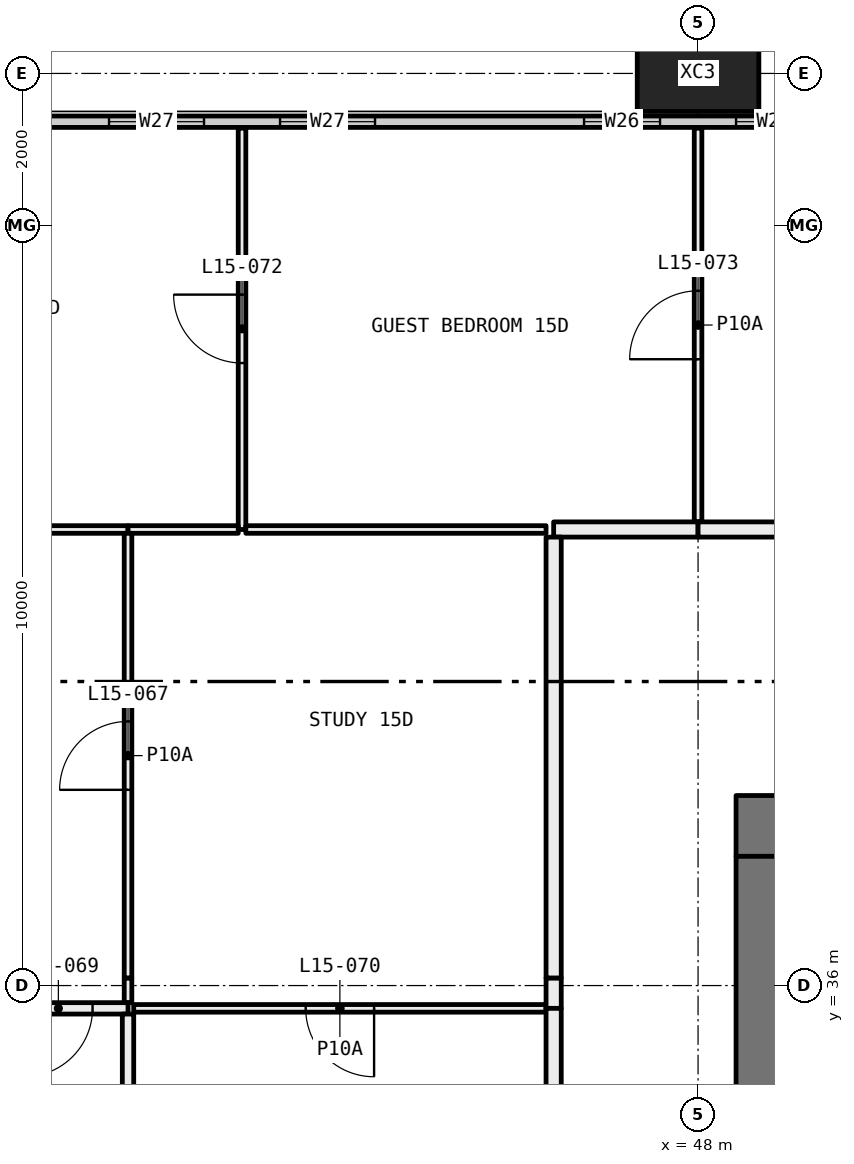
"""IFC4 building model, lengths in metres.
Left out: names, types, materials, properties, quantities, classifications, styles, units other than length and angle.
Written with IfcOpenShell. Run it as: python <this file> out.ifc"""

import sys

from ifc_helpers import new_model, si_unit, direction, frame, frame_2d, origin, origin_2d, place, context, subcontext, project, spatial, rectangle, hollow_rectangle, extrude, element, fill, save


model = new_model("IFC4")
c1 = context("Model", 3, precision=1e-05, world=origin(), true_north=direction((0.0, 1.0)))
c2 = subcontext(c1, "Body", "Model", "MODEL_VIEW")
j1 = project(units=[si_unit("LENGTHUNIT", "METRE"), si_unit("PLANEANGLEUNIT", "RADIAN")], contexts=[c1])
p1 = place(None, origin())
s1 = spatial("IfcSite", under=j1, at=p1, CompositionType="ELEMENT")
p2 = place(p1, origin())
s2 = spatial("IfcBuilding", under=s1, at=p2, CompositionType="ELEMENT")
p3 = place(p2, frame((0.0, 0.0, 64.5)))
s3 = spatial("IfcBuildingStorey", under=s2, at=p3, CompositionType="ELEMENT", Elevation=64.5)
p4 = place(p3, frame((48.0, 48.0, -0.4), z_axis=(0.0, 0.0, 1.0), x_axis=(1.0, 0.0, 0.0)))
e1 = element("IfcColumn", 1, at=p4, inside=s3, PredefinedType="COLUMN", context=c2, shape_type="SweptSolid", body=[
    extrude(hollow_rectangle(XDim=1.6, YDim=1.0, WallThickness=0.065, at=origin_2d()), origin(), (0.0, 0.0, 1.0), 3.45),
])
p5 = place(p3, frame((6.56, 47.365, 0.0), z_axis=(0.0, 0.0, 1.0), x_axis=(1.0, 0.0, 0.0)))
e2 = element("IfcWall", 2, at=p5, inside=s3, PredefinedType="ELEMENTEDWALL", context=c2, shape_type="SweptSolid", body=[
    extrude(rectangle(XDim=58.88, YDim=0.15, at=frame_2d((29.44, 0.0))), origin(), (0.0, 0.0, 1.0), 3.05),
])
p6 = place(p5, frame((0.44, 0.0, 0.45)))
e3 = element("IfcOpeningElement", 3, at=p6, cuts=e2, PredefinedType="OPENING", context=c2, shape_type="SweptSolid", body=[
    extrude(rectangle(XDim=4.5, YDim=2.55, at=frame_2d((2.25, 1.275))), frame((0.0, 0.085, 0.0), z_axis=(0.0, -1.0, 0.0), x_axis=(1.0, 0.0, 0.0)), (0.0, 0.0, 1.0), 0.17),
])
p7 = place(p5, frame((5.94, 0.0, 0.45)))
e4 = element("IfcOpeningElement", 4, at=p7, cuts=e2, PredefinedType="OPENING", context=c2, shape_type="SweptSolid", body=[
    extrude(rectangle(XDim=1.0, YDim=2.55, at=frame_2d((0.5, 1.275))), frame((0.0, 0.085, 0.0), z_axis=(0.0, -1.0, 0.0), x_axis=(1.0, 0.0, 0.0)), (0.0, 0.0, 1.0), 0.17),
])
p8 = place(p5, frame((9.69, 0.0, 0.45)))
e5 = element("IfcOpeningElement", 5, at=p8, cuts=e2, PredefinedType="OPENING", context=c2, shape_type="SweptSolid", body=[
    extrude(rectangle(XDim=1.25, YDim=2.55, at=frame_2d((0.625, 1.275))), frame((0.0, 0.085, 0.0), z_axis=(0.0, -1.0, 0.0), x_axis=(1.0, 0.0, 0.0)), (0.0, 0.0, 1.0), 0.17),
])
p9 = place(p5, frame((11.94, 0.0, 0.45)))
e6 = element("IfcOpeningElement", 6, at=p9, cuts=e2, PredefinedType="OPENING", context=c2, shape_type="SweptSolid", body=[
    extrude(rectangle(XDim=1.25, YDim=2.55, at=frame_2d((0.625, 1.275))), frame((0.0, 0.085, 0.0), z_axis=(0.0, -1.0, 0.0), x_axis=(1.0, 0.0, 0.0)), (0.0, 0.0, 1.0), 0.17),
])
p10 = place(p5, frame((15.94, 0.0, 0.45)))
e7 = element("IfcOpeningElement", 7, at=p10, cuts=e2, PredefinedType="OPENING", context=c2, shape_type="SweptSolid", body=[
    extrude(rectangle(XDim=1.0, YDim=2.55, at=frame_2d((0.5, 1.275))), frame((0.0, 0.085, 0.0), z_axis=(0.0, -1.0, 0.0), x_axis=(1.0, 0.0, 0.0)), (0.0, 0.0, 1.0), 0.17),
])
p11 = place(p5, frame((17.94, 0.0, 0.45)))
e8 = element("IfcOpeningElement", 8, at=p11, cuts=e2, PredefinedType="OPENING", context=c2, shape_type="SweptSolid", body=[
    extrude(rectangle(XDim=1.0, YDim=2.55, at=frame_2d((0.5, 1.275))), frame((0.0, 0.085, 0.0), z_axis=(0.0, -1.0, 0.0), x_axis=(1.0, 0.0, 0.0)), (0.0, 0.0, 1.0), 0.17),
])
p12 = place(p5, frame((21.69, 0.0, 0.45)))
e9 = element("IfcOpeningElement", 9, at=p12, cuts=e2, PredefinedType="OPENING", context=c2, shape_type="SweptSolid", body=[
    extrude(rectangle(XDim=1.25, YDim=2.55, at=frame_2d((0.625, 1.275))), frame((0.0, 0.085, 0.0), z_axis=(0.0, -1.0, 0.0), x_axis=(1.0, 0.0, 0.0)), (0.0, 0.0, 1.0), 0.17),
])
p13 = place(p5, frame((23.94, 0.0, 0.45)))
e10 = element("IfcOpeningElement", 10, at=p13, cuts=e2, PredefinedType="OPENING", context=c2, shape_type="SweptSolid", body=[
    extrude(rectangle(XDim=1.25, YDim=2.55, at=frame_2d((0.625, 1.275))), frame((0.0, 0.085, 0.0), z_axis=(0.0, -1.0, 0.0), x_axis=(1.0, 0.0, 0.0)), (0.0, 0.0, 1.0), 0.17),
])
p14 = place(p5, frame((27.94, 0.0, 0.45)))
e11 = element("IfcOpeningElement", 11, at=p14, cuts=e2, PredefinedType="OPENING", context=c2, shape_type="SweptSolid", body=[
    extrude(rectangle(XDim=1.0, YDim=2.55, at=frame_2d((0.5, 1.275))), frame((0.0, 0.085, 0.0), z_axis=(0.0, -1.0, 0.0), x_axis=(1.0, 0.0, 0.0)), (0.0, 0.0, 1.0), 0.17),
])
p15 = place(p5, frame((29.94, 0.0, 0.45)))
e12 = element("IfcOpeningElement", 12, at=p15, cuts=e2, PredefinedType="OPENING", context=c2, shape_type="SweptSolid", body=[
    extrude(rectangle(XDim=1.0, YDim=2.55, at=frame_2d((0.5, 1.275))), frame((0.0, 0.085, 0.0), z_axis=(0.0, -1.0, 0.0), x_axis=(1.0, 0.0, 0.0)), (0.0, 0.0, 1.0), 0.17),
])
p16 = place(p5, frame((33.69, 0.0, 0.45)))
e13 = element("IfcOpeningElement", 13, at=p16, cuts=e2, PredefinedType="OPENING", context=c2, shape_type="SweptSolid", body=[
    extrude(rectangle(XDim=1.25, YDim=2.55, at=frame_2d((0.625, 1.275))), frame((0.0, 0.085, 0.0), z_axis=(0.0, -1.0, 0.0), x_axis=(1.0, 0.0, 0.0)), (0.0, 0.0, 1.0), 0.17),
])
p17 = place(p5, frame((35.94, 0.0, 0.45)))
e14 = element("IfcOpeningElement", 14, at=p17, cuts=e2, PredefinedType="OPENING", context=c2, shape_type="SweptSolid", body=[
    extrude(rectangle(XDim=1.25, YDim=2.55, at=frame_2d((0.625, 1.275))), frame((0.0, 0.085, 0.0), z_axis=(0.0, -1.0, 0.0), x_axis=(1.0, 0.0, 0.0)), (0.0, 0.0, 1.0), 0.17),
])
p18 = place(p5, frame((39.94, 0.0, 0.45)))
e15 = element("IfcOpeningElement", 15, at=p18, cuts=e2, PredefinedType="OPENING", context=c2, shape_type="SweptSolid", body=[
    extrude(rectangle(XDim=1.0, YDim=2.55, at=frame_2d((0.5, 1.275))), frame((0.0, 0.085, 0.0), z_axis=(0.0, -1.0, 0.0), x_axis=(1.0, 0.0, 0.0)), (0.0, 0.0, 1.0), 0.17),
])
p19 = place(p5, frame((41.94, 0.0, 0.45)))
e16 = element("IfcOpeningElement", 16, at=p19, cuts=e2, PredefinedType="OPENING", context=c2, shape_type="SweptSolid", body=[
    extrude(rectangle(XDim=1.0, YDim=2.55, at=frame_2d((0.5, 1.275))), frame((0.0, 0.085, 0.0), z_axis=(0.0, -1.0, 0.0), x_axis=(1.0, 0.0, 0.0)), (0.0, 0.0, 1.0), 0.17),
])
p20 = place(p5, frame((45.69, 0.0, 0.45)))
e17 = element("IfcOpeningElement", 17, at=p20, cuts=e2, PredefinedType="OPENING", context=c2, shape_type="SweptSolid", body=[
    extrude(rectangle(XDim=1.25, YDim=2.55, at=frame_2d((0.625, 1.275))), frame((0.0, 0.085, 0.0), z_axis=(0.0, -1.0, 0.0), x_axis=(1.0, 0.0, 0.0)), (0.0, 0.0, 1.0), 0.17),
])
p21 = place(p5, frame((47.94, 0.0, 0.45)))
e18 = element("IfcOpeningElement", 18, at=p21, cuts=e2, PredefinedType="OPENING", context=c2, shape_type="SweptSolid", body=[
    extrude(rectangle(XDim=1.25, YDim=2.55, at=frame_2d((0.625, 1.275))), frame((0.0, 0.085, 0.0), z_axis=(0.0, -1.0, 0.0), x_axis=(1.0, 0.0, 0.0)), (0.0, 0.0, 1.0), 0.17),
])
p22 = place(p5, frame((51.94, 0.0, 0.45)))
e19 = element("IfcOpeningElement", 19, at=p22, cuts=e2, PredefinedType="OPENING", context=c2, shape_type="SweptSolid", body=[
    extrude(rectangle(XDim=1.0, YDim=2.55, at=frame_2d((0.5, 1.275))), frame((0.0, 0.085, 0.0), z_axis=(0.0, -1.0, 0.0), x_axis=(1.0, 0.0, 0.0)), (0.0, 0.0, 1.0), 0.17),
])
p23 = place(p5, frame((53.94, 0.0, 0.45)))
e20 = element("IfcOpeningElement", 20, at=p23, cuts=e2, PredefinedType="OPENING", context=c2, shape_type="SweptSolid", body=[
    extrude(rectangle(XDim=4.5, YDim=2.55, at=frame_2d((2.25, 1.275))), frame((0.0, 0.085, 0.0), z_axis=(0.0, -1.0, 0.0), x_axis=(1.0, 0.0, 0.0)), (0.0, 0.0, 1.0), 0.17),
])
p24 = place(p3, frame((42.0, 42.0, 0.0), z_axis=(0.0, 0.0, 1.0), x_axis=(0.0, 1.0, 0.0)))
e21 = element("IfcWall", 21, at=p24, inside=s3, PredefinedType="PARTITIONING", context=c2, shape_type="SweptSolid", body=[
    extrude(rectangle(XDim=5.28, YDim=0.1, at=frame_2d((2.64, 0.0))), origin(), (0.0, 0.0, 1.0), 3.05),
])
p25 = place(p24, frame((2.19, 0.0, 0.0)))
e22 = element("IfcOpeningElement", 22, at=p25, cuts=e21, PredefinedType="OPENING", context=c2, shape_type="SweptSolid", body=[
    extrude(rectangle(XDim=0.9, YDim=2.1, at=frame_2d((0.45, 1.05))), frame((0.0, 0.06, 0.0), z_axis=(0.0, -1.0, 0.0), x_axis=(1.0, 0.0, 0.0)), (0.0, 0.0, 1.0), 0.12),
])
p26 = place(p3, frame((36.075, 42.0, 0.0), z_axis=(0.0, 0.0, 1.0), x_axis=(1.0, 0.0, 0.0)))
e23 = element("IfcWall", 23, at=p26, inside=s3, PredefinedType="PARTITIONING", context=c2, shape_type="SweptSolid", body=[
    extrude(rectangle(XDim=4.425, YDim=0.1, at=frame_2d((2.212, 0.0))), origin(), (0.0, 0.0, 1.0), 2.45),
])
p27 = place(p26, frame((1.762, 0.0, 0.0)))
e24 = element("IfcOpeningElement", 24, at=p27, cuts=e23, PredefinedType="OPENING", context=c2, shape_type="SweptSolid", body=[
    extrude(rectangle(XDim=0.9, YDim=2.1, at=frame_2d((0.45, 1.05))), frame((0.0, 0.06, 0.0), z_axis=(0.0, -1.0, 0.0), x_axis=(1.0, 0.0, 0.0)), (0.0, 0.0, 1.0), 0.12),
])
p28 = place(p3, frame((40.5, 42.0, 0.0), z_axis=(0.0, 0.0, 1.0), x_axis=(1.0, 0.0, 0.0)))
e25 = element("IfcWall", 25, at=p28, inside=s3, PredefinedType="PARTITIONING", context=c2, shape_type="SweptSolid", body=[
    extrude(rectangle(XDim=1.45, YDim=0.1, at=frame_2d((0.725, 0.0))), origin(), (0.0, 0.0, 1.0), 3.05),
])
p29 = place(p3, frame((48.0, 42.1, 0.0), z_axis=(0.0, 0.0, 1.0), x_axis=(0.0, 1.0, 0.0)))
e26 = element("IfcWall", 26, at=p29, inside=s3, PredefinedType="PARTITIONING", context=c2, shape_type="SweptSolid", body=[
    extrude(rectangle(XDim=5.18, YDim=0.1, at=frame_2d((2.59, 0.0))), origin(), (0.0, 0.0, 1.0), 3.05),
])
p30 = place(p29, frame((2.14, 0.0, 0.0)))
e27 = element("IfcOpeningElement", 27, at=p30, cuts=e26, PredefinedType="OPENING", context=c2, shape_type="SweptSolid", body=[
    extrude(rectangle(XDim=0.9, YDim=2.1, at=frame_2d((0.45, 1.05))), frame((0.0, 0.06, 0.0), z_axis=(0.0, -1.0, 0.0), x_axis=(1.0, 0.0, 0.0)), (0.0, 0.0, 1.0), 0.12),
])
p31 = place(p3, frame((42.05, 42.0, 0.0), z_axis=(0.0, 0.0, 1.0), x_axis=(1.0, 0.0, 0.0)))
e28 = element("IfcWall", 28, at=p31, inside=s3, PredefinedType="PARTITIONING", context=c2, shape_type="SweptSolid", body=[
    extrude(rectangle(XDim=3.95, YDim=0.1, at=frame_2d((1.975, 0.0))), origin(), (0.0, 0.0, 1.0), 3.05),
])
p32 = place(p3, frame((46.1, 42.0, 0.0), z_axis=(0.0, 0.0, 1.0), x_axis=(1.0, 0.0, 0.0)))
e29 = element("IfcWall", 29, at=p32, inside=s3, PredefinedType="PARTITIONING", context=c2, shape_type="SweptSolid", body=[
    extrude(rectangle(XDim=1.9, YDim=0.2, at=frame_2d((0.95, 0.0))), origin(), (0.0, 0.0, 1.0), 3.05),
])
p33 = place(p3, frame((48.0, 42.0, 0.0), z_axis=(0.0, 0.0, 1.0), x_axis=(1.0, 0.0, 0.0)))
e30 = element("IfcWall", 30, at=p33, inside=s3, PredefinedType="PARTITIONING", context=c2, shape_type="SweptSolid", body=[
    extrude(rectangle(XDim=6.0, YDim=0.2, at=frame_2d((3.0, 0.0))), origin(), (0.0, 0.0, 1.0), 3.05),
])
p34 = place(p3, frame((40.5, 35.775, 0.0), z_axis=(0.0, 0.0, 1.0), x_axis=(0.0, 1.0, 0.0)))
e31 = element("IfcWall", 31, at=p34, inside=s3, PredefinedType="PARTITIONING", context=c2, shape_type="SweptSolid", body=[
    extrude(rectangle(XDim=0.325, YDim=0.1, at=frame_2d((0.163, 0.0))), origin(), (0.0, 0.0, 1.0), 2.45),
])
p35 = place(p3, frame((40.5, 36.1, 0.0), z_axis=(0.0, 0.0, 1.0), x_axis=(0.0, 1.0, 0.0)))
e32 = element("IfcWall", 32, at=p35, inside=s3, PredefinedType="PARTITIONING", context=c2, shape_type="SweptSolid", body=[
    extrude(rectangle(XDim=5.85, YDim=0.1, at=frame_2d((2.925, 0.0))), origin(), (0.0, 0.0, 1.0), 3.05),
])
p36 = place(p35, frame((2.475, 0.0, 0.0)))
e33 = element("IfcOpeningElement", 33, at=p36, cuts=e32, PredefinedType="OPENING", context=c2, shape_type="SweptSolid", body=[
    extrude(rectangle(XDim=0.9, YDim=2.1, at=frame_2d((0.45, 1.05))), frame((0.0, 0.06, 0.0), z_axis=(0.0, -1.0, 0.0), x_axis=(1.0, 0.0, 0.0)), (0.0, 0.0, 1.0), 0.12),
])
p37 = place(p3, frame((38.667, 35.7, 0.0), z_axis=(0.0, 0.0, 1.0), x_axis=(1.0, 0.0, 0.0)))
e34 = element("IfcWall", 34, at=p37, inside=s3, PredefinedType="PARTITIONING", context=c2, shape_type="SweptSolid", body=[
    extrude(rectangle(XDim=1.833, YDim=0.15, at=frame_2d((0.917, 0.0))), origin(), (0.0, 0.0, 1.0), 3.05),
])
p38 = place(p37, frame((0.467, 0.0, 0.0)))
e35 = element("IfcOpeningElement", 35, at=p38, cuts=e34, PredefinedType="OPENING", context=c2, shape_type="SweptSolid", body=[
    extrude(rectangle(XDim=0.9, YDim=2.1, at=frame_2d((0.45, 1.05))), frame((0.0, 0.085, 0.0), z_axis=(0.0, -1.0, 0.0), x_axis=(1.0, 0.0, 0.0)), (0.0, 0.0, 1.0), 0.17),
])
p39 = place(p3, frame((40.575, 35.7, 0.0), z_axis=(0.0, 0.0, 1.0), x_axis=(1.0, 0.0, 0.0)))
e36 = element("IfcWall", 36, at=p39, inside=s3, PredefinedType="PARTITIONING", context=c2, shape_type="SweptSolid", body=[
    extrude(rectangle(XDim=5.425, YDim=0.1, at=frame_2d((2.712, 0.0))), origin(), (0.0, 0.0, 1.0), 3.05),
])
p40 = place(p39, frame((2.262, 0.0, 0.0)))
e37 = element("IfcOpeningElement", 37, at=p40, cuts=e36, PredefinedType="OPENING", context=c2, shape_type="SweptSolid", body=[
    extrude(rectangle(XDim=0.9, YDim=2.1, at=frame_2d((0.45, 1.05))), frame((0.0, 0.06, 0.0), z_axis=(0.0, -1.0, 0.0), x_axis=(1.0, 0.0, 0.0)), (0.0, 0.0, 1.0), 0.12),
])
p41 = place(p3, frame((46.1, 35.7, 0.0), z_axis=(0.0, 0.0, 1.0), x_axis=(0.0, 1.0, 0.0)))
e38 = element("IfcWall", 38, at=p41, inside=s3, PredefinedType="PARTITIONING", context=c2, shape_type="SweptSolid", body=[
    extrude(rectangle(XDim=0.4, YDim=0.2, at=frame_2d((0.2, 0.0))), origin(), (0.0, 0.0, 1.0), 2.45),
])
p42 = place(p3, frame((46.1, 36.1, 0.0), z_axis=(0.0, 0.0, 1.0), x_axis=(0.0, 1.0, 0.0)))
e39 = element("IfcWall", 39, at=p42, inside=s3, PredefinedType="PARTITIONING", context=c2, shape_type="SweptSolid", body=[
    extrude(rectangle(XDim=5.8, YDim=0.2, at=frame_2d((2.9, 0.0))), origin(), (0.0, 0.0, 1.0), 3.05),
])
p43 = place(p3, frame((40.5, 31.3, 0.0), z_axis=(0.0, 0.0, 1.0), x_axis=(0.0, 1.0, 0.0)))
e40 = element("IfcWall", 40, at=p43, inside=s3, PredefinedType="PARTITIONING", context=c2, shape_type="SweptSolid", body=[
    extrude(rectangle(XDim=4.325, YDim=0.15, at=frame_2d((2.163, 0.0))), origin(), (0.0, 0.0, 1.0), 3.05),
])
p44 = place(p3, frame((46.1, 31.3, 0.0), z_axis=(0.0, 0.0, 1.0), x_axis=(0.0, 1.0, 0.0)))
e41 = element("IfcWall", 41, at=p44, inside=s3, PredefinedType="PARTITIONING", context=c2, shape_type="SweptSolid", body=[
    extrude(rectangle(XDim=4.4, YDim=0.2, at=frame_2d((2.2, 0.0))), origin(), (0.0, 0.0, 1.0), 3.05),
])
p45 = place(p3, frame((59.5, 38.1, 0.0), z_axis=(0.0, 0.0, 1.0), x_axis=(-1.0, 0.0, 0.0)))
e42 = element("IfcWall", 42, at=p45, inside=s3, PredefinedType="SHEAR", context=c2, shape_type="SweptSolid", body=[
    extrude(rectangle(XDim=11.0, YDim=0.8, at=frame_2d((5.5, 0.0))), origin(), (0.0, 0.0, 1.0), 3.05),
])
p46 = place(p45, frame((8.4, 0.0, 0.0)))
e43 = element("IfcOpeningElement", 43, at=p46, cuts=e42, PredefinedType="OPENING", context=c2, shape_type="SweptSolid", body=[
    extrude(rectangle(XDim=1.6, YDim=2.1, at=frame_2d((0.8, 1.05))), frame((0.0, 0.41, 0.0), z_axis=(0.0, -1.0, 0.0), x_axis=(1.0, 0.0, 0.0)), (0.0, 0.0, 1.0), 0.82),
])
p47 = place(p3, frame((48.9, 22.3, 0.0), z_axis=(0.0, 0.0, 1.0), x_axis=(0.0, 1.0, 0.0)))
e44 = element("IfcWall", 44, at=p47, inside=s3, PredefinedType="SHEAR", context=c2, shape_type="SweptSolid", body=[
    extrude(rectangle(XDim=15.4, YDim=0.8, at=frame_2d((7.7, 0.0))), origin(), (0.0, 0.0, 1.0), 3.05),
])
p48 = place(p47, frame((6.9, 0.0, 0.0)))
e45 = element("IfcOpeningElement", 45, at=p48, cuts=e44, PredefinedType="OPENING", context=c2, shape_type="SweptSolid", body=[
    extrude(rectangle(XDim=1.6, YDim=2.1, at=frame_2d((0.8, 1.05))), frame((0.0, 0.41, 0.0), z_axis=(0.0, -1.0, 0.0), x_axis=(1.0, 0.0, 0.0)), (0.0, 0.0, 1.0), 0.82),
])
p49 = place(p16, origin())
e46 = element("IfcWindow", 46, at=p49, inside=s3, PartitioningType="SINGLE_PANEL", PredefinedType="WINDOW", context=c2, shape_type="SweptSolid", body=[
    extrude(rectangle(XDim=1.25, YDim=2.55, at=frame_2d((0.625, 1.275))), frame((0.0, 0.03, 0.0), z_axis=(0.0, -1.0, 0.0), x_axis=(1.0, 0.0, 0.0)), (0.0, 0.0, 1.0), 0.06),
])
fill(e13, e46)
p50 = place(p17, origin())
e47 = element("IfcWindow", 47, at=p50, inside=s3, PartitioningType="SINGLE_PANEL", PredefinedType="WINDOW", context=c2, shape_type="SweptSolid", body=[
    extrude(rectangle(XDim=1.25, YDim=2.55, at=frame_2d((0.625, 1.275))), frame((0.0, 0.03, 0.0), z_axis=(0.0, -1.0, 0.0), x_axis=(1.0, 0.0, 0.0)), (0.0, 0.0, 1.0), 0.06),
])
fill(e14, e47)
p51 = place(p18, origin())
e48 = element("IfcWindow", 48, at=p51, inside=s3, PartitioningType="SINGLE_PANEL", PredefinedType="WINDOW", context=c2, shape_type="SweptSolid", body=[
    extrude(rectangle(XDim=1.0, YDim=2.55, at=frame_2d((0.5, 1.275))), frame((0.0, 0.03, 0.0), z_axis=(0.0, -1.0, 0.0), x_axis=(1.0, 0.0, 0.0)), (0.0, 0.0, 1.0), 0.06),
])
fill(e15, e48)
p52 = place(p19, origin())
e49 = element("IfcWindow", 49, at=p52, inside=s3, PartitioningType="SINGLE_PANEL", PredefinedType="WINDOW", context=c2, shape_type="SweptSolid", body=[
    extrude(rectangle(XDim=1.0, YDim=2.55, at=frame_2d((0.5, 1.275))), frame((0.0, 0.03, 0.0), z_axis=(0.0, -1.0, 0.0), x_axis=(1.0, 0.0, 0.0)), (0.0, 0.0, 1.0), 0.06),
])
fill(e16, e49)
p53 = place(p36, origin())
e50 = element("IfcDoor", 50, at=p53, inside=s3, OperationType="SINGLE_SWING_RIGHT", PredefinedType="DOOR", context=c2, shape_type="SweptSolid", body=[
    extrude(rectangle(XDim=0.9, YDim=2.1, at=frame_2d((0.45, 1.05))), frame((0.0, 0.025, 0.0), z_axis=(0.0, -1.0, 0.0), x_axis=(1.0, 0.0, 0.0)), (0.0, 0.0, 1.0), 0.05),
])
fill(e33, e50)
p54 = place(p38, frame((0.9, 0.0, 0.0), x_axis=(-1.0, 0.0, 0.0)))
e51 = element("IfcDoor", 51, at=p54, inside=s3, OperationType="SINGLE_SWING_LEFT", PredefinedType="DOOR", context=c2, shape_type="SweptSolid", body=[
    extrude(rectangle(XDim=0.9, YDim=2.1, at=frame_2d((0.45, 1.05))), frame((0.0, 0.025, 0.0), z_axis=(0.0, -1.0, 0.0), x_axis=(1.0, 0.0, 0.0)), (0.0, 0.0, 1.0), 0.05),
])
fill(e35, e51)
p55 = place(p40, frame((0.9, 0.0, 0.0), x_axis=(-1.0, 0.0, 0.0)))
e52 = element("IfcDoor", 52, at=p55, inside=s3, OperationType="SINGLE_SWING_RIGHT", PredefinedType="DOOR", context=c2, shape_type="SweptSolid", body=[
    extrude(rectangle(XDim=0.9, YDim=2.1, at=frame_2d((0.45, 1.05))), frame((0.0, 0.025, 0.0), z_axis=(0.0, -1.0, 0.0), x_axis=(1.0, 0.0, 0.0)), (0.0, 0.0, 1.0), 0.05),
])
fill(e37, e52)
p56 = place(p25, origin())
e53 = element("IfcDoor", 53, at=p56, inside=s3, OperationType="SINGLE_SWING_LEFT", PredefinedType="DOOR", context=c2, shape_type="SweptSolid", body=[
    extrude(rectangle(XDim=0.9, YDim=2.1, at=frame_2d((0.45, 1.05))), frame((0.0, 0.025, 0.0), z_axis=(0.0, -1.0, 0.0), x_axis=(1.0, 0.0, 0.0)), (0.0, 0.0, 1.0), 0.05),
])
fill(e22, e53)
p57 = place(p30, origin())
e54 = element("IfcDoor", 54, at=p57, inside=s3, OperationType="SINGLE_SWING_RIGHT", PredefinedType="DOOR", context=c2, shape_type="SweptSolid", body=[
    extrude(rectangle(XDim=0.9, YDim=2.1, at=frame_2d((0.45, 1.05))), frame((0.0, 0.025, 0.0), z_axis=(0.0, -1.0, 0.0), x_axis=(1.0, 0.0, 0.0)), (0.0, 0.0, 1.0), 0.05),
])
fill(e27, e54)
save(model, sys.argv[1])
